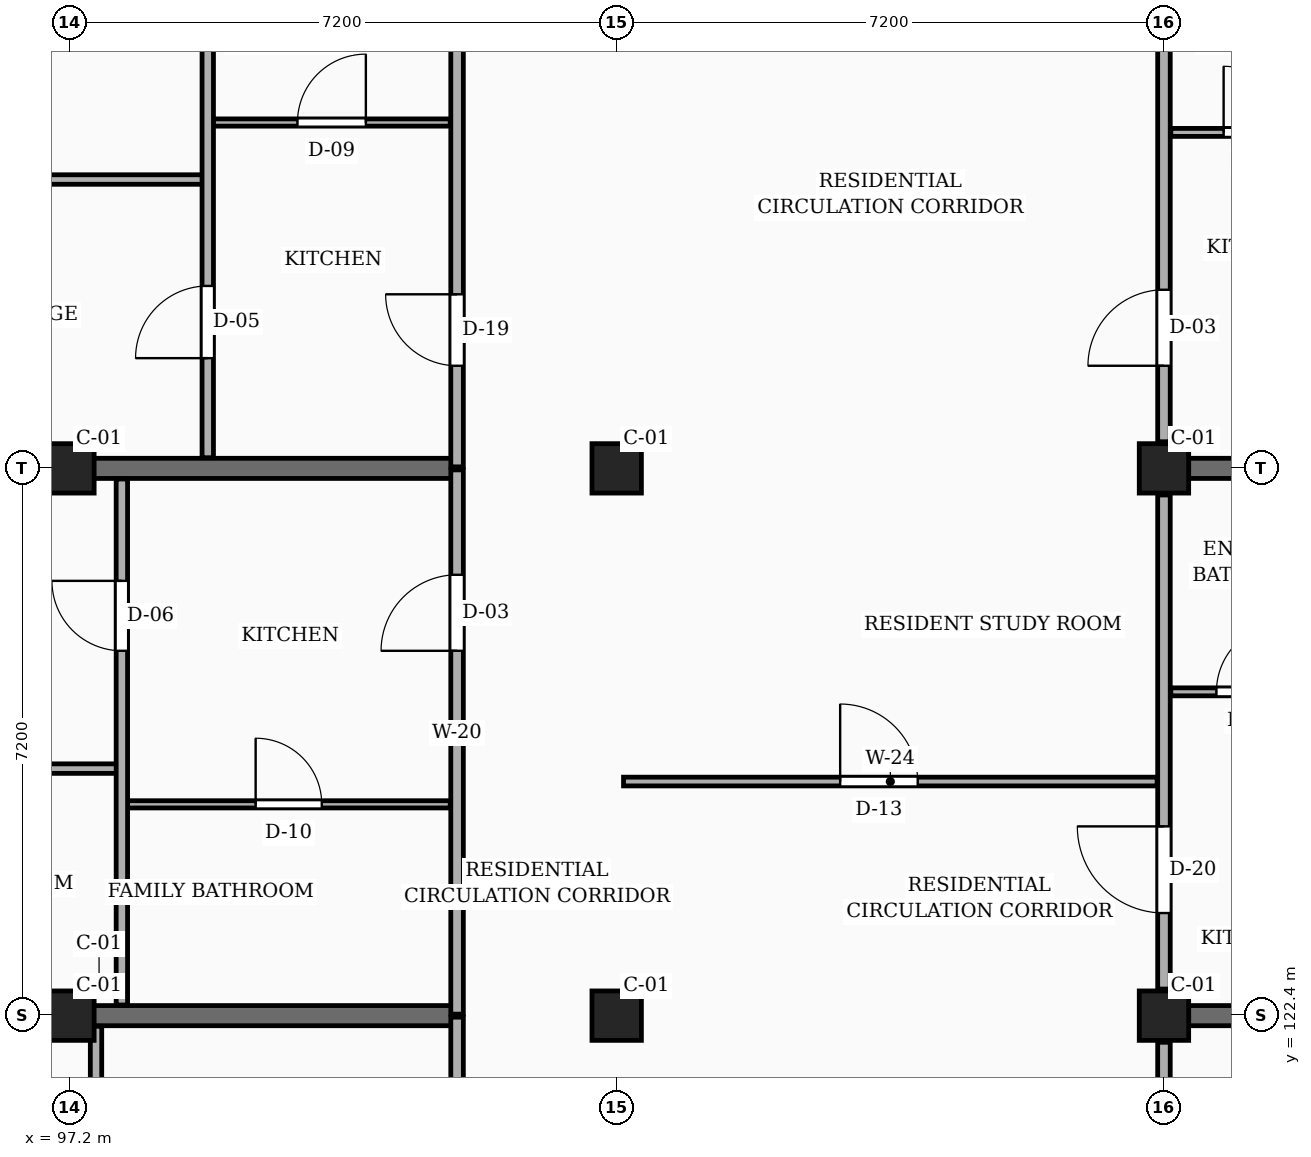
"""IFC4 building model, lengths in metres.
Left out: names, types, materials, properties, quantities, classifications, styles, units other than length and angle.
Written with IfcOpenShell. Run it as: python <this file> out.ifc"""

import sys

from ifc_helpers import new_model, si_unit, direction, frame, frame_2d, origin, origin_2d, place, context, subcontext, project, spatial, rectangle, extrude, element, fill, save


model = new_model("IFC4")
c1 = context("Model", 3, precision=1e-05, world=origin(), true_north=direction((0.0, 1.0)))
c2 = subcontext(c1, "Body", "Model", "MODEL_VIEW")
j1 = project(units=[si_unit("LENGTHUNIT", "METRE"), si_unit("PLANEANGLEUNIT", "RADIAN")], contexts=[c1])
p1 = place(None, origin())
s1 = spatial("IfcSite", under=j1, at=p1, CompositionType="ELEMENT")
p2 = place(p1, origin())
s2 = spatial("IfcBuilding", under=s1, at=p2, CompositionType="ELEMENT")
p3 = place(p2, frame((0.0, 0.0, 4.5)))
s3 = spatial("IfcBuildingStorey", under=s2, at=p3, CompositionType="ELEMENT", Elevation=4.5)
for number, where, z_axis, x_axis in (
    (1, (97.2, 122.4, 0.0), (0.0, 0.0, 1.0), (1.0, 0.0, 0.0)),
    (2, (97.2, 129.6, 0.0), (0.0, 0.0, 1.0), (1.0, 0.0, 0.0)),
    (3, (104.4, 122.4, 0.0), (0.0, 0.0, 1.0), (1.0, 0.0, 0.0)),
    (4, (104.4, 129.6, 0.0), (0.0, 0.0, 1.0), (1.0, 0.0, 0.0)),
    (5, (111.6, 122.4, 0.0), (0.0, 0.0, 1.0), (1.0, 0.0, 0.0)),
    (6, (111.6, 129.6, 0.0), (0.0, 0.0, 1.0), (1.0, 0.0, 0.0)),
):
    element("IfcColumn", number, at=place(p3, frame(where, z_axis=z_axis, x_axis=x_axis)), inside=s3, PredefinedType="COLUMN", context=c2, shape_type="SweptSolid", body=[
        extrude(rectangle(XDim=0.65, YDim=0.65, at=origin_2d()), origin(), (0.0, 0.0, 1.0), 3.15),
    ])
p4 = place(p3, frame((90.3, 122.4, 0.0), z_axis=(0.0, 0.0, 1.0), x_axis=(1.0, 0.0, 0.0)))
e7 = element("IfcWall", 7, at=p4, inside=s3, PredefinedType="SOLIDWALL", context=c2, shape_type="SweptSolid", body=[
    extrude(rectangle(XDim=12.0, YDim=0.265, at=frame_2d((6.0, 0.0))), origin(), (0.0, 0.0, 1.0), 2.19),
])
p5 = place(p3, frame((111.925, 122.4, 0.0), z_axis=(0.0, 0.0, 1.0), x_axis=(1.0, 0.0, 0.0)))
e8 = element("IfcWall", 8, at=p5, inside=s3, PredefinedType="SOLIDWALL", context=c2, shape_type="SweptSolid", body=[
    extrude(rectangle(XDim=6.575, YDim=0.265, at=frame_2d((3.288, 0.0))), origin(), (0.0, 0.0, 1.0), 2.19),
])
p6 = place(p3, frame((90.3, 129.6, 0.0), z_axis=(0.0, 0.0, 1.0), x_axis=(1.0, 0.0, 0.0)))
e9 = element("IfcWall", 9, at=p6, inside=s3, PredefinedType="SOLIDWALL", context=c2, shape_type="SweptSolid", body=[
    extrude(rectangle(XDim=12.0, YDim=0.265, at=frame_2d((6.0, 0.0))), origin(), (0.0, 0.0, 1.0), 2.19),
])
p7 = place(p3, frame((111.925, 129.6, 0.0), z_axis=(0.0, 0.0, 1.0), x_axis=(1.0, 0.0, 0.0)))
e10 = element("IfcWall", 10, at=p7, inside=s3, PredefinedType="SOLIDWALL", context=c2, shape_type="SweptSolid", body=[
    extrude(rectangle(XDim=6.575, YDim=0.265, at=frame_2d((3.288, 0.0))), origin(), (0.0, 0.0, 1.0), 2.19),
])
p8 = place(p3, frame((102.3, 115.22, 0.0), z_axis=(0.0, 0.0, 1.0), x_axis=(0.0, 1.0, 0.0)))
e11 = element("IfcWall", 11, at=p8, inside=s3, PredefinedType="PARTITIONING", context=c2, shape_type="SweptSolid", body=[
    extrude(rectangle(XDim=7.16, YDim=0.165, at=frame_2d((3.58, 0.0))), origin(), (0.0, 0.0, 1.0), 2.325),
])
p9 = place(p8, frame((4.78, 0.0, 0.0)))
e12 = element("IfcOpeningElement", 12, at=p9, cuts=e11, PredefinedType="OPENING", context=c2, shape_type="SweptSolid", body=[
    extrude(rectangle(XDim=1.14, YDim=2.18, at=frame_2d((0.57, 1.09))), frame((0.0, 0.093, 0.0), z_axis=(0.0, -1.0, 0.0), x_axis=(1.0, 0.0, 0.0)), (0.0, 0.0, 1.0), 0.185),
])
p10 = place(p3, frame((102.3, 122.42, 0.0), z_axis=(0.0, 0.0, 1.0), x_axis=(0.0, 1.0, 0.0)))
e13 = element("IfcWall", 13, at=p10, inside=s3, PredefinedType="PARTITIONING", context=c2, shape_type="SweptSolid", body=[
    extrude(rectangle(XDim=7.16, YDim=0.165, at=frame_2d((3.58, 0.0))), origin(), (0.0, 0.0, 1.0), 2.325),
])
p11 = place(p10, frame((4.78, 0.0, 0.0)))
e14 = element("IfcOpeningElement", 14, at=p11, cuts=e13, PredefinedType="OPENING", context=c2, shape_type="SweptSolid", body=[
    extrude(rectangle(XDim=1.0, YDim=2.15, at=frame_2d((0.5, 1.075))), frame((0.0, 0.093, 0.0), z_axis=(0.0, -1.0, 0.0), x_axis=(1.0, 0.0, 0.0)), (0.0, 0.0, 1.0), 0.185),
])
p12 = place(p3, frame((102.3, 129.62, 0.0), z_axis=(0.0, 0.0, 1.0), x_axis=(0.0, 1.0, 0.0)))
e15 = element("IfcWall", 15, at=p12, inside=s3, PredefinedType="PARTITIONING", context=c2, shape_type="SweptSolid", body=[
    extrude(rectangle(XDim=7.005, YDim=0.165, at=frame_2d((3.502, 0.0))), origin(), (0.0, 0.0, 1.0), 2.325),
])
p13 = place(p12, frame((1.33, 0.0, 0.0)))
e16 = element("IfcOpeningElement", 16, at=p13, cuts=e15, PredefinedType="OPENING", context=c2, shape_type="SweptSolid", body=[
    extrude(rectangle(XDim=0.94, YDim=2.12, at=frame_2d((0.47, 1.06))), frame((0.0, 0.093, 0.0), z_axis=(0.0, -1.0, 0.0), x_axis=(1.0, 0.0, 0.0)), (0.0, 0.0, 1.0), 0.185),
])
p14 = place(p3, frame((111.6, 115.55, 0.0), z_axis=(0.0, 0.0, 1.0), x_axis=(0.0, 1.0, 0.0)))
e17 = element("IfcWall", 17, at=p14, inside=s3, PredefinedType="PARTITIONING", context=c2, shape_type="SweptSolid", body=[
    extrude(rectangle(XDim=6.5, YDim=0.165, at=frame_2d((3.25, 0.0))), origin(), (0.0, 0.0, 1.0), 2.24),
])
p15 = place(p14, frame((1.1, 0.0, 0.0)))
e18 = element("IfcOpeningElement", 18, at=p15, cuts=e17, PredefinedType="OPENING", context=c2, shape_type="SweptSolid", body=[
    extrude(rectangle(XDim=0.94, YDim=2.12, at=frame_2d((0.47, 1.06))), frame((0.0, 0.093, 0.0), z_axis=(0.0, -1.0, 0.0), x_axis=(1.0, 0.0, 0.0)), (0.0, 0.0, 1.0), 0.185),
])
p16 = place(p3, frame((111.6, 122.75, 0.0), z_axis=(0.0, 0.0, 1.0), x_axis=(0.0, 1.0, 0.0)))
e19 = element("IfcWall", 19, at=p16, inside=s3, PredefinedType="PARTITIONING", context=c2, shape_type="SweptSolid", body=[
    extrude(rectangle(XDim=6.5, YDim=0.165, at=frame_2d((3.25, 0.0))), origin(), (0.0, 0.0, 1.0), 2.24),
])
p17 = place(p16, frame((1.0, 0.0, 0.0)))
e20 = element("IfcOpeningElement", 20, at=p17, cuts=e19, PredefinedType="OPENING", context=c2, shape_type="SweptSolid", body=[
    extrude(rectangle(XDim=1.14, YDim=2.18, at=frame_2d((0.57, 1.09))), frame((0.0, 0.093, 0.0), z_axis=(0.0, -1.0, 0.0), x_axis=(1.0, 0.0, 0.0)), (0.0, 0.0, 1.0), 0.185),
])
p18 = place(p3, frame((111.6, 129.95, 0.0), z_axis=(0.0, 0.0, 1.0), x_axis=(0.0, 1.0, 0.0)))
e21 = element("IfcWall", 21, at=p18, inside=s3, PredefinedType="PARTITIONING", context=c2, shape_type="SweptSolid", body=[
    extrude(rectangle(XDim=6.5, YDim=0.165, at=frame_2d((3.25, 0.0))), origin(), (0.0, 0.0, 1.0), 2.24),
])
p19 = place(p18, frame((1.0, 0.0, 0.0)))
e22 = element("IfcOpeningElement", 22, at=p19, cuts=e21, PredefinedType="OPENING", context=c2, shape_type="SweptSolid", body=[
    extrude(rectangle(XDim=1.0, YDim=2.15, at=frame_2d((0.5, 1.075))), frame((0.0, 0.093, 0.0), z_axis=(0.0, -1.0, 0.0), x_axis=(1.0, 0.0, 0.0)), (0.0, 0.0, 1.0), 0.185),
])
p20 = place(p3, frame((97.55, 115.34, 0.0), z_axis=(0.0, 0.0, 1.0), x_axis=(0.0, 1.0, 0.0)))
e23 = element("IfcWall", 23, at=p20, inside=s3, PredefinedType="PARTITIONING", context=c2, shape_type="SweptSolid", body=[
    extrude(rectangle(XDim=6.92, YDim=0.15, at=frame_2d((3.46, 0.0))), origin(), (0.0, 0.0, 1.0), 2.325),
])
p21 = place(p20, frame((4.66, 0.0, 0.0)))
e24 = element("IfcOpeningElement", 24, at=p21, cuts=e23, PredefinedType="OPENING", context=c2, shape_type="SweptSolid", body=[
    extrude(rectangle(XDim=0.95, YDim=2.1, at=frame_2d((0.475, 1.05))), frame((0.0, 0.085, 0.0), z_axis=(0.0, -1.0, 0.0), x_axis=(1.0, 0.0, 0.0)), (0.0, 0.0, 1.0), 0.17),
])
p22 = place(p3, frame((104.49, 125.48, 0.0), z_axis=(0.0, 0.0, 1.0), x_axis=(1.0, 0.0, 0.0)))
e25 = element("IfcWall", 25, at=p22, inside=s3, PredefinedType="PARTITIONING", context=c2, shape_type="SweptSolid", body=[
    extrude(rectangle(XDim=7.02, YDim=0.115, at=frame_2d((3.51, 0.0))), origin(), (0.0, 0.0, 1.0), 2.325),
])
p23 = place(p22, frame((2.85, 0.0, 0.0)))
e26 = element("IfcOpeningElement", 26, at=p23, cuts=e25, PredefinedType="OPENING", context=c2, shape_type="SweptSolid", body=[
    extrude(rectangle(XDim=1.02, YDim=2.15, at=frame_2d((0.51, 1.075))), frame((0.0, 0.067, 0.0), z_axis=(0.0, -1.0, 0.0), x_axis=(1.0, 0.0, 0.0)), (0.0, 0.0, 1.0), 0.135),
])
p24 = place(p3, frame((90.175, 125.65, 0.0), z_axis=(0.0, 0.0, 1.0), x_axis=(1.0, 0.0, 0.0)))
e27 = element("IfcWall", 27, at=p24, inside=s3, PredefinedType="PARTITIONING", context=c2, shape_type="SweptSolid", body=[
    extrude(rectangle(XDim=7.645, YDim=0.125, at=frame_2d((3.823, 0.0))), origin(), (0.0, 0.0, 1.0), 2.325),
])
p25 = place(p24, frame((3.383, 0.0, 0.0)))
e28 = element("IfcOpeningElement", 28, at=p25, cuts=e27, PredefinedType="OPENING", context=c2, shape_type="SweptSolid", body=[
    extrude(rectangle(XDim=0.88, YDim=2.08, at=frame_2d((0.44, 1.04))), frame((0.0, 0.073, 0.0), z_axis=(0.0, -1.0, 0.0), x_axis=(1.0, 0.0, 0.0)), (0.0, 0.0, 1.0), 0.145),
])
p26 = place(p3, frame((97.96, 125.18, 0.0), z_axis=(0.0, 0.0, 1.0), x_axis=(1.0, 0.0, 0.0)))
e29 = element("IfcWall", 29, at=p26, inside=s3, PredefinedType="PARTITIONING", context=c2, shape_type="SweptSolid", body=[
    extrude(rectangle(XDim=4.25, YDim=0.095, at=frame_2d((2.125, 0.0))), origin(), (0.0, 0.0, 1.0), 2.325),
])
p27 = place(p26, frame((1.69, 0.0, 0.0)))
e30 = element("IfcOpeningElement", 30, at=p27, cuts=e29, PredefinedType="OPENING", context=c2, shape_type="SweptSolid", body=[
    extrude(rectangle(XDim=0.87, YDim=2.05, at=frame_2d((0.435, 1.025))), frame((0.0, 0.058, 0.0), z_axis=(0.0, -1.0, 0.0), x_axis=(1.0, 0.0, 0.0)), (0.0, 0.0, 1.0), 0.115),
])
p28 = place(p3, frame((97.89, 122.54, 0.0), z_axis=(0.0, 0.0, 1.0), x_axis=(0.0, 1.0, 0.0)))
e31 = element("IfcWall", 31, at=p28, inside=s3, PredefinedType="PARTITIONING", context=c2, shape_type="SweptSolid", body=[
    extrude(rectangle(XDim=6.92, YDim=0.15, at=frame_2d((3.46, 0.0))), origin(), (0.0, 0.0, 1.0), 2.325),
])
p29 = place(p28, frame((4.66, 0.0, 0.0)))
e32 = element("IfcOpeningElement", 32, at=p29, cuts=e31, PredefinedType="OPENING", context=c2, shape_type="SweptSolid", body=[
    extrude(rectangle(XDim=0.92, YDim=2.1, at=frame_2d((0.46, 1.05))), frame((0.0, 0.085, 0.0), z_axis=(0.0, -1.0, 0.0), x_axis=(1.0, 0.0, 0.0)), (0.0, 0.0, 1.0), 0.17),
])
p30 = place(p3, frame((111.69, 126.66, 0.0), z_axis=(0.0, 0.0, 1.0), x_axis=(1.0, 0.0, 0.0)))
e33 = element("IfcWall", 33, at=p30, inside=s3, PredefinedType="PARTITIONING", context=c2, shape_type="SweptSolid", body=[
    extrude(rectangle(XDim=2.1, YDim=0.105, at=frame_2d((1.05, 0.0))), origin(), (0.0, 0.0, 1.0), 2.325),
])
p31 = place(p30, frame((0.6, 0.0, 0.0)))
e34 = element("IfcOpeningElement", 34, at=p31, cuts=e33, PredefinedType="OPENING", context=c2, shape_type="SweptSolid", body=[
    extrude(rectangle(XDim=0.9, YDim=2.05, at=frame_2d((0.45, 1.025))), frame((0.0, 0.062, 0.0), z_axis=(0.0, -1.0, 0.0), x_axis=(1.0, 0.0, 0.0)), (0.0, 0.0, 1.0), 0.125),
])
p32 = place(p3, frame((90.175, 133.4, 0.0), z_axis=(0.0, 0.0, 1.0), x_axis=(1.0, 0.0, 0.0)))
e35 = element("IfcWall", 35, at=p32, inside=s3, PredefinedType="PARTITIONING", context=c2, shape_type="SweptSolid", body=[
    extrude(rectangle(XDim=8.775, YDim=0.125, at=frame_2d((4.387, 0.0))), origin(), (0.0, 0.0, 1.0), 2.325),
])
p33 = place(p32, frame((3.938, 0.0, 0.0)))
e36 = element("IfcOpeningElement", 36, at=p33, cuts=e35, PredefinedType="OPENING", context=c2, shape_type="SweptSolid", body=[
    extrude(rectangle(XDim=0.9, YDim=2.1, at=frame_2d((0.45, 1.05))), frame((0.0, 0.073, 0.0), z_axis=(0.0, -1.0, 0.0), x_axis=(1.0, 0.0, 0.0)), (0.0, 0.0, 1.0), 0.145),
])
p34 = place(p3, frame((99.09, 134.15, 0.0), z_axis=(0.0, 0.0, 1.0), x_axis=(1.0, 0.0, 0.0)))
e37 = element("IfcWall", 37, at=p34, inside=s3, PredefinedType="PARTITIONING", context=c2, shape_type="SweptSolid", body=[
    extrude(rectangle(XDim=3.12, YDim=0.095, at=frame_2d((1.56, 0.0))), origin(), (0.0, 0.0, 1.0), 2.325),
])
p35 = place(p34, frame((1.11, 0.0, 0.0)))
e38 = element("IfcOpeningElement", 38, at=p35, cuts=e37, PredefinedType="OPENING", context=c2, shape_type="SweptSolid", body=[
    extrude(rectangle(XDim=0.9, YDim=2.05, at=frame_2d((0.45, 1.025))), frame((0.0, 0.058, 0.0), z_axis=(0.0, -1.0, 0.0), x_axis=(1.0, 0.0, 0.0)), (0.0, 0.0, 1.0), 0.115),
])
p36 = place(p3, frame((99.02, 129.74, 0.0), z_axis=(0.0, 0.0, 1.0), x_axis=(0.0, 1.0, 0.0)))
e39 = element("IfcWall", 39, at=p36, inside=s3, PredefinedType="PARTITIONING", context=c2, shape_type="SweptSolid", body=[
    extrude(rectangle(XDim=6.885, YDim=0.15, at=frame_2d((3.442, 0.0))), origin(), (0.0, 0.0, 1.0), 2.325),
])
p37 = place(p36, frame((1.31, 0.0, 0.0)))
e40 = element("IfcOpeningElement", 40, at=p37, cuts=e39, PredefinedType="OPENING", context=c2, shape_type="SweptSolid", body=[
    extrude(rectangle(XDim=0.95, YDim=2.1, at=frame_2d((0.475, 1.05))), frame((0.0, 0.085, 0.0), z_axis=(0.0, -1.0, 0.0), x_axis=(1.0, 0.0, 0.0)), (0.0, 0.0, 1.0), 0.17),
])
p38 = place(p3, frame((111.69, 134.02, 0.0), z_axis=(0.0, 0.0, 1.0), x_axis=(1.0, 0.0, 0.0)))
e41 = element("IfcWall", 41, at=p38, inside=s3, PredefinedType="PARTITIONING", context=c2, shape_type="SweptSolid", body=[
    extrude(rectangle(XDim=2.26, YDim=0.105, at=frame_2d((1.13, 0.0))), origin(), (0.0, 0.0, 1.0), 2.325),
])
p39 = place(p38, frame((0.695, 0.0, 0.0)))
e42 = element("IfcOpeningElement", 42, at=p39, cuts=e41, PredefinedType="OPENING", context=c2, shape_type="SweptSolid", body=[
    extrude(rectangle(XDim=0.87, YDim=2.05, at=frame_2d((0.435, 1.025))), frame((0.0, 0.062, 0.0), z_axis=(0.0, -1.0, 0.0), x_axis=(1.0, 0.0, 0.0)), (0.0, 0.0, 1.0), 0.125),
])
p40 = place(p11, origin())
e43 = element("IfcDoor", 43, at=p40, inside=s3, OperationType="SINGLE_SWING_LEFT", PredefinedType="DOOR", context=c2, shape_type="SweptSolid", body=[
    extrude(rectangle(XDim=1.0, YDim=2.15, at=frame_2d((0.5, 1.075))), frame((0.0, 0.025, 0.0), z_axis=(0.0, -1.0, 0.0), x_axis=(1.0, 0.0, 0.0)), (0.0, 0.0, 1.0), 0.05),
])
fill(e14, e43)
p41 = place(p13, origin())
e44 = element("IfcDoor", 44, at=p41, inside=s3, OperationType="SINGLE_SWING_RIGHT", PredefinedType="DOOR", context=c2, shape_type="SweptSolid", body=[
    extrude(rectangle(XDim=0.94, YDim=2.12, at=frame_2d((0.47, 1.06))), frame((0.0, 0.025, 0.0), z_axis=(0.0, -1.0, 0.0), x_axis=(1.0, 0.0, 0.0)), (0.0, 0.0, 1.0), 0.05),
])
fill(e16, e44)
p42 = place(p17, origin())
e45 = element("IfcDoor", 45, at=p42, inside=s3, OperationType="SINGLE_SWING_RIGHT", PredefinedType="DOOR", context=c2, shape_type="SweptSolid", body=[
    extrude(rectangle(XDim=1.14, YDim=2.18, at=frame_2d((0.57, 1.09))), frame((0.0, 0.025, 0.0), z_axis=(0.0, -1.0, 0.0), x_axis=(1.0, 0.0, 0.0)), (0.0, 0.0, 1.0), 0.05),
])
fill(e20, e45)
p43 = place(p19, origin())
e46 = element("IfcDoor", 46, at=p43, inside=s3, OperationType="SINGLE_SWING_LEFT", PredefinedType="DOOR", context=c2, shape_type="SweptSolid", body=[
    extrude(rectangle(XDim=1.0, YDim=2.15, at=frame_2d((0.5, 1.075))), frame((0.0, 0.025, 0.0), z_axis=(0.0, -1.0, 0.0), x_axis=(1.0, 0.0, 0.0)), (0.0, 0.0, 1.0), 0.05),
])
fill(e22, e46)
p44 = place(p23, origin())
e47 = element("IfcDoor", 47, at=p44, inside=s3, OperationType="SINGLE_SWING_LEFT", PredefinedType="DOOR", context=c2, shape_type="SweptSolid", body=[
    extrude(rectangle(XDim=1.02, YDim=2.15, at=frame_2d((0.51, 1.075))), frame((0.0, 0.025, 0.0), z_axis=(0.0, -1.0, 0.0), x_axis=(1.0, 0.0, 0.0)), (0.0, 0.0, 1.0), 0.05),
])
fill(e26, e47)
p45 = place(p27, origin())
e48 = element("IfcDoor", 48, at=p45, inside=s3, OperationType="SINGLE_SWING_LEFT", PredefinedType="DOOR", context=c2, shape_type="SweptSolid", body=[
    extrude(rectangle(XDim=0.87, YDim=2.05, at=frame_2d((0.435, 1.025))), frame((0.0, 0.025, 0.0), z_axis=(0.0, -1.0, 0.0), x_axis=(1.0, 0.0, 0.0)), (0.0, 0.0, 1.0), 0.05),
])
fill(e30, e48)
p46 = place(p29, origin())
e49 = element("IfcDoor", 49, at=p46, inside=s3, OperationType="SINGLE_SWING_RIGHT", PredefinedType="DOOR", context=c2, shape_type="SweptSolid", body=[
    extrude(rectangle(XDim=0.92, YDim=2.1, at=frame_2d((0.46, 1.05))), frame((0.0, 0.025, 0.0), z_axis=(0.0, -1.0, 0.0), x_axis=(1.0, 0.0, 0.0)), (0.0, 0.0, 1.0), 0.05),
])
fill(e32, e49)
p47 = place(p31, origin())
e50 = element("IfcDoor", 50, at=p47, inside=s3, OperationType="SINGLE_SWING_RIGHT", PredefinedType="DOOR", context=c2, shape_type="SweptSolid", body=[
    extrude(rectangle(XDim=0.9, YDim=2.05, at=frame_2d((0.45, 1.025))), frame((0.0, 0.025, 0.0), z_axis=(0.0, -1.0, 0.0), x_axis=(1.0, 0.0, 0.0)), (0.0, 0.0, 1.0), 0.05),
])
fill(e34, e50)
p48 = place(p35, origin())
e51 = element("IfcDoor", 51, at=p48, inside=s3, OperationType="SINGLE_SWING_RIGHT", PredefinedType="DOOR", context=c2, shape_type="SweptSolid", body=[
    extrude(rectangle(XDim=0.9, YDim=2.05, at=frame_2d((0.45, 1.025))), frame((0.0, 0.025, 0.0), z_axis=(0.0, -1.0, 0.0), x_axis=(1.0, 0.0, 0.0)), (0.0, 0.0, 1.0), 0.05),
])
fill(e38, e51)
p49 = place(p37, origin())
e52 = element("IfcDoor", 52, at=p49, inside=s3, OperationType="SINGLE_SWING_LEFT", PredefinedType="DOOR", context=c2, shape_type="SweptSolid", body=[
    extrude(rectangle(XDim=0.95, YDim=2.1, at=frame_2d((0.475, 1.05))), frame((0.0, 0.025, 0.0), z_axis=(0.0, -1.0, 0.0), x_axis=(1.0, 0.0, 0.0)), (0.0, 0.0, 1.0), 0.05),
])
fill(e40, e52)
p50 = place(p39, origin())
e53 = element("IfcDoor", 53, at=p50, inside=s3, OperationType="SINGLE_SWING_LEFT", PredefinedType="DOOR", context=c2, shape_type="SweptSolid", body=[
    extrude(rectangle(XDim=0.87, YDim=2.05, at=frame_2d((0.435, 1.025))), frame((0.0, 0.025, 0.0), z_axis=(0.0, -1.0, 0.0), x_axis=(1.0, 0.0, 0.0)), (0.0, 0.0, 1.0), 0.05),
])
fill(e42, e53)
save(model, sys.argv[1])
